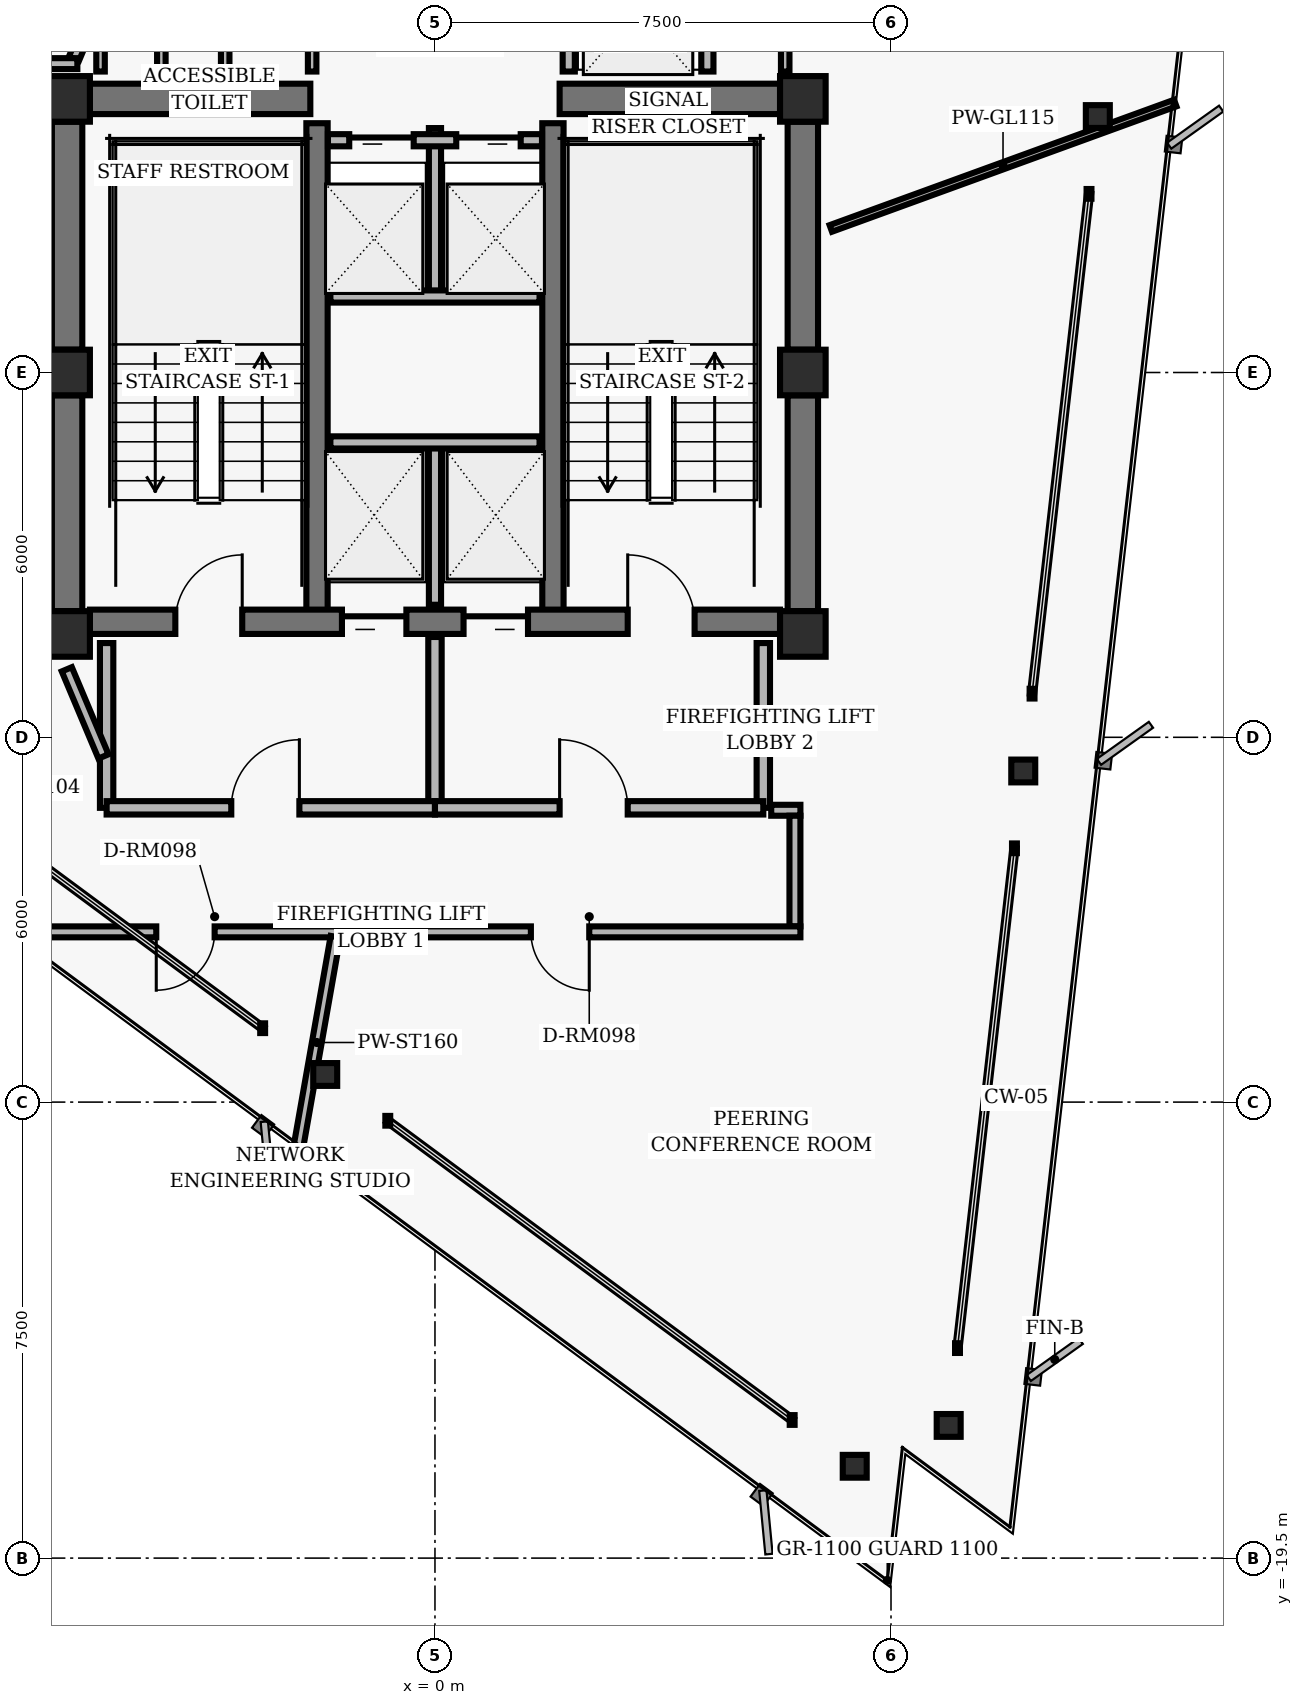
"""IFC4 building model, lengths in metres.
Left out: names, types, materials, properties, quantities, classifications, styles, units other than length and angle.
Written with IfcOpenShell. Run it as: python <this file> out.ifc"""

import sys

from ifc_helpers import new_model, si_unit, direction, frame, frame_2d, origin, origin_2d, place, context, subcontext, project, spatial, rectangle, hollow_rectangle, i_section, extrude, element, fill, save


model = new_model("IFC4")
c1 = context("Model", 3, precision=1e-05, world=origin(), true_north=direction((0.0, 1.0)))
c2 = subcontext(c1, "Body", "Model", "MODEL_VIEW")
j1 = project(units=[si_unit("LENGTHUNIT", "METRE"), si_unit("PLANEANGLEUNIT", "RADIAN")], contexts=[c1])
p1 = place(None, origin())
s1 = spatial("IfcSite", under=j1, at=p1, CompositionType="ELEMENT")
p2 = place(p1, origin())
s2 = spatial("IfcBuilding", under=s1, at=p2, CompositionType="ELEMENT")
p3 = place(p2, frame((0.0, 0.0, 217.92)))
s3 = spatial("IfcBuildingStorey", under=s2, at=p3, CompositionType="ELEMENT", Elevation=217.92)
for number, where, z_axis, x_axis in (
    (1, (-6.05, 4.5, 0.0), (0.0, 0.0, 1.0), (1.0, 0.0, 0.0)),
    (2, (6.05, 4.5, 0.0), (0.0, 0.0, 1.0), (1.0, 0.0, 0.0)),
    (3, (-6.05, 0.0, 0.0), (0.0, 0.0, 1.0), (1.0, 0.0, 0.0)),
    (4, (6.05, 0.0, 0.0), (0.0, 0.0, 1.0), (1.0, 0.0, 0.0)),
    (5, (-6.05, -4.3, 0.0), (0.0, 0.0, 1.0), (1.0, 0.0, 0.0)),
    (6, (6.05, -4.3, 0.0), (0.0, 0.0, 1.0), (1.0, 0.0, 0.0)),
):
    element("IfcColumn", number, at=place(p3, frame(where, z_axis=z_axis, x_axis=x_axis)), inside=s3, PredefinedType="COLUMN", context=c2, shape_type="SweptSolid", body=[
        extrude(hollow_rectangle(XDim=0.75, YDim=0.75, WallThickness=0.05, InnerFilletRadius=0.02, OuterFilletRadius=0.04, at=origin_2d()), origin(), (0.0, 0.0, 1.0), 3.04),
    ])
p4 = place(p3, frame((-6.05, 0.375, 0.0), z_axis=(0.0, 0.0, 1.0), x_axis=(0.0, 1.0, 0.0)))
e7 = element("IfcWall", 7, at=p4, inside=s3, PredefinedType="SHEAR", context=c2, shape_type="SweptSolid", body=[
    extrude(rectangle(XDim=3.75, YDim=0.5, at=frame_2d((1.875, 0.0))), origin(), (0.0, 0.0, 1.0), 2.798),
])
p5 = place(p3, frame((-6.05, -3.925, 0.0), z_axis=(0.0, 0.0, 1.0), x_axis=(0.0, 1.0, 0.0)))
e8 = element("IfcWall", 8, at=p5, inside=s3, PredefinedType="SHEAR", context=c2, shape_type="SweptSolid", body=[
    extrude(rectangle(XDim=3.55, YDim=0.5, at=frame_2d((1.775, 0.0))), origin(), (0.0, 0.0, 1.0), 2.798),
])
p6 = place(p3, frame((6.05, 0.375, 0.0), z_axis=(0.0, 0.0, 1.0), x_axis=(0.0, 1.0, 0.0)))
e9 = element("IfcWall", 9, at=p6, inside=s3, PredefinedType="SHEAR", context=c2, shape_type="SweptSolid", body=[
    extrude(rectangle(XDim=3.75, YDim=0.5, at=frame_2d((1.875, 0.0))), origin(), (0.0, 0.0, 1.0), 2.798),
])
p7 = place(p3, frame((6.05, -3.925, 0.0), z_axis=(0.0, 0.0, 1.0), x_axis=(0.0, 1.0, 0.0)))
e10 = element("IfcWall", 10, at=p7, inside=s3, PredefinedType="SHEAR", context=c2, shape_type="SweptSolid", body=[
    extrude(rectangle(XDim=3.55, YDim=0.5, at=frame_2d((1.775, 0.0))), origin(), (0.0, 0.0, 1.0), 2.798),
])
for number, where, z_axis, x_axis in (
    (11, (-1.94, -4.1, 0.0), (0.0, 0.0, 1.0), (0.0, 1.0, 0.0)),
    (12, (1.94, -4.1, 0.0), (0.0, 0.0, 1.0), (0.0, 1.0, 0.0)),
):
    element("IfcWall", number, at=place(p3, frame(where, z_axis=z_axis, x_axis=x_axis)), inside=s3, PredefinedType="SHEAR", context=c2, shape_type="SweptSolid", body=[
        extrude(rectangle(XDim=8.2, YDim=0.35, at=frame_2d((4.1, 0.0))), origin(), (0.0, 0.0, 1.0), 2.798),
    ])
p8 = place(p3, frame((-5.675, -4.1, 0.0), z_axis=(0.0, 0.0, 1.0), x_axis=(1.0, 0.0, 0.0)))
e13 = element("IfcWall", 13, at=p8, inside=s3, PredefinedType="SHEAR", context=c2, shape_type="SweptSolid", body=[
    extrude(rectangle(XDim=11.35, YDim=0.4, at=frame_2d((5.675, 0.0))), origin(), (0.0, 0.0, 1.0), 2.798),
])
p9 = place(p8, frame((1.405, 0.0, 0.0)))
e14 = element("IfcOpeningElement", 14, at=p9, cuts=e13, PredefinedType="OPENING", context=c2, shape_type="SweptSolid", body=[
    extrude(rectangle(XDim=1.1, YDim=2.04, at=frame_2d((0.55, 1.02))), frame((0.0, 0.21, 0.0), z_axis=(0.0, -1.0, 0.0), x_axis=(1.0, 0.0, 0.0)), (0.0, 0.0, 1.0), 0.42),
])
p10 = place(p8, frame((8.845, 0.0, 0.0)))
e15 = element("IfcOpeningElement", 15, at=p10, cuts=e13, PredefinedType="OPENING", context=c2, shape_type="SweptSolid", body=[
    extrude(rectangle(XDim=1.1, YDim=2.04, at=frame_2d((0.55, 1.02))), frame((0.0, 0.21, 0.0), z_axis=(0.0, -1.0, 0.0), x_axis=(1.0, 0.0, 0.0)), (0.0, 0.0, 1.0), 0.42),
])
p11 = place(p8, frame((4.145, 0.0, 0.0)))
e16 = element("IfcOpeningElement", 16, at=p11, cuts=e13, PredefinedType="OPENING", context=c2, shape_type="SweptSolid", body=[
    extrude(rectangle(XDim=1.06, YDim=2.04, at=frame_2d((0.53, 1.02))), frame((0.0, 0.21, 0.0), z_axis=(0.0, -1.0, 0.0), x_axis=(1.0, 0.0, 0.0)), (0.0, 0.0, 1.0), 0.42),
])
p12 = place(p8, frame((6.145, 0.0, 0.0)))
e17 = element("IfcOpeningElement", 17, at=p12, cuts=e13, PredefinedType="OPENING", context=c2, shape_type="SweptSolid", body=[
    extrude(rectangle(XDim=1.06, YDim=2.04, at=frame_2d((0.53, 1.02))), frame((0.0, 0.21, 0.0), z_axis=(0.0, -1.0, 0.0), x_axis=(1.0, 0.0, 0.0)), (0.0, 0.0, 1.0), 0.42),
])
for number, where, z_axis, x_axis in (
    (18, (-5.675, 4.5, 0.0), (0.0, 0.0, 1.0), (1.0, 0.0, 0.0)),
    (19, (2.05, 4.5, 0.0), (0.0, 0.0, 1.0), (1.0, 0.0, 0.0)),
):
    element("IfcWall", number, at=place(p3, frame(where, z_axis=z_axis, x_axis=x_axis)), inside=s3, PredefinedType="SHEAR", context=c2, shape_type="SweptSolid", body=[
        extrude(rectangle(XDim=3.625, YDim=0.5, at=frame_2d((1.812, 0.0))), origin(), (0.0, 0.0, 1.0), 2.798),
    ])
for number, where, z_axis, x_axis in (
    (20, (8.448, -17.318, 0.0), (0.0, 0.0, 1.0), (1.0, 0.0, 0.0)),
    (21, (9.675, -6.554, 0.0), (0.0, 0.0, 1.0), (1.0, 0.0, 0.0)),
    (22, (10.901, 4.21, 0.0), (0.0, 0.0, 1.0), (1.0, 0.0, 0.0)),
    (23, (-1.805, -11.546, 0.0), (0.0, 0.0, 1.0), (1.0, 0.0, 0.0)),
    (24, (6.903, -17.99, 0.0), (0.0, 0.0, 1.0), (1.0, 0.0, 0.0)),
):
    element("IfcColumn", number, at=place(p3, frame(where, z_axis=z_axis, x_axis=x_axis)), inside=s3, PredefinedType="COLUMN", context=c2, shape_type="SweptSolid", body=[
        extrude(i_section(OverallWidth=0.394, OverallDepth=0.375, WebThickness=0.017, FlangeThickness=0.028, FilletRadius=0.016, at=origin_2d()), origin(), (0.0, 0.0, 1.0), 3.04),
    ])
p13 = place(p3, frame((0.0, -3.82, 0.0), z_axis=(0.0, 0.0, 1.0), x_axis=(0.0, 1.0, 0.0)))
e25 = element("IfcWall", 25, at=p13, inside=s3, PredefinedType="PARTITIONING", context=c2, shape_type="SweptSolid", body=[
    extrude(rectangle(XDim=2.67, YDim=0.2, at=frame_2d((1.335, 0.0))), origin(), (0.0, 0.0, 1.0), 2.773),
])
p14 = place(p3, frame((-1.72, -1.15, 0.0), z_axis=(0.0, 0.0, 1.0), x_axis=(1.0, 0.0, 0.0)))
e26 = element("IfcWall", 26, at=p14, inside=s3, PredefinedType="PARTITIONING", context=c2, shape_type="SweptSolid", body=[
    extrude(rectangle(XDim=3.44, YDim=0.2, at=frame_2d((1.72, 0.0))), origin(), (0.0, 0.0, 1.0), 2.773),
])
for number, where, z_axis, x_axis in (
    (27, (-5.4, -7.16, 0.0), (0.0, 0.0, 1.0), (0.0, 1.0, 0.0)),
    (28, (5.4, -7.16, 0.0), (0.0, 0.0, 1.0), (0.0, 1.0, 0.0)),
):
    element("IfcWall", number, at=place(p3, frame(where, z_axis=z_axis, x_axis=x_axis)), inside=s3, PredefinedType="PARTITIONING", context=c2, shape_type="SweptSolid", body=[
        extrude(rectangle(XDim=2.71, YDim=0.22, at=frame_2d((1.355, 0.0))), origin(), (0.0, 0.0, 1.0), 2.773),
    ])
p15 = place(p3, frame((0.0, -7.16, 0.0), z_axis=(0.0, 0.0, 1.0), x_axis=(0.0, 1.0, 0.0)))
e29 = element("IfcWall", 29, at=p15, inside=s3, PredefinedType="PARTITIONING", context=c2, shape_type="SweptSolid", body=[
    extrude(rectangle(XDim=2.81, YDim=0.22, at=frame_2d((1.405, 0.0))), origin(), (0.0, 0.0, 1.0), 2.773),
])
p16 = place(p3, frame((-5.4, -7.16, 0.0), z_axis=(0.0, 0.0, 1.0), x_axis=(1.0, 0.0, 0.0)))
e30 = element("IfcWall", 30, at=p16, inside=s3, PredefinedType="PARTITIONING", context=c2, shape_type="SweptSolid", body=[
    extrude(rectangle(XDim=5.4, YDim=0.22, at=frame_2d((2.7, 0.0))), origin(), (0.0, 0.0, 1.0), 2.395),
])
p17 = place(p16, frame((2.05, 0.0, 0.0)))
e31 = element("IfcOpeningElement", 31, at=p17, cuts=e30, PredefinedType="OPENING", context=c2, shape_type="SweptSolid", body=[
    extrude(rectangle(XDim=1.12, YDim=2.02, at=frame_2d((0.56, 1.01))), frame((0.0, 0.12, 0.0), z_axis=(0.0, -1.0, 0.0), x_axis=(1.0, 0.0, 0.0)), (0.0, 0.0, 1.0), 0.24),
])
p18 = place(p3, frame((0.0, -7.16, 0.0), z_axis=(0.0, 0.0, 1.0), x_axis=(1.0, 0.0, 0.0)))
e32 = element("IfcWall", 32, at=p18, inside=s3, PredefinedType="PARTITIONING", context=c2, shape_type="SweptSolid", body=[
    extrude(rectangle(XDim=5.4, YDim=0.22, at=frame_2d((2.7, 0.0))), origin(), (0.0, 0.0, 1.0), 2.773),
])
p19 = place(p18, frame((2.05, 0.0, 0.0)))
e33 = element("IfcOpeningElement", 33, at=p19, cuts=e32, PredefinedType="OPENING", context=c2, shape_type="SweptSolid", body=[
    extrude(rectangle(XDim=1.12, YDim=2.02, at=frame_2d((0.56, 1.01))), frame((0.0, 0.12, 0.0), z_axis=(0.0, -1.0, 0.0), x_axis=(1.0, 0.0, 0.0)), (0.0, 0.0, 1.0), 0.24),
])
p20 = place(p3, frame((0.0, 1.25, 0.0), z_axis=(0.0, 0.0, 1.0), x_axis=(0.0, 1.0, 0.0)))
e34 = element("IfcWall", 34, at=p20, inside=s3, PredefinedType="PARTITIONING", context=c2, shape_type="SweptSolid", body=[
    extrude(rectangle(XDim=2.77, YDim=0.2, at=frame_2d((1.385, 0.0))), origin(), (0.0, 0.0, 1.0), 2.773),
])
p21 = place(p3, frame((-1.72, 1.25, 0.0), z_axis=(0.0, 0.0, 1.0), x_axis=(1.0, 0.0, 0.0)))
e35 = element("IfcWall", 35, at=p21, inside=s3, PredefinedType="PARTITIONING", context=c2, shape_type="SweptSolid", body=[
    extrude(rectangle(XDim=3.44, YDim=0.2, at=frame_2d((1.72, 0.0))), origin(), (0.0, 0.0, 1.0), 2.773),
])
p22 = place(p3, frame((-1.76, 3.82, 0.0), z_axis=(0.0, 0.0, 1.0), x_axis=(1.0, 0.0, 0.0)))
e36 = element("IfcWall", 36, at=p22, inside=s3, PredefinedType="PARTITIONING", context=c2, shape_type="SweptSolid", body=[
    extrude(rectangle(XDim=3.52, YDim=0.2, at=frame_2d((1.76, 0.0))), origin(), (0.0, 0.0, 1.0), 2.773),
])
p23 = place(p22, frame((0.35, 0.0, 0.0)))
e37 = element("IfcOpeningElement", 37, at=p23, cuts=e36, PredefinedType="OPENING", context=c2, shape_type="SweptSolid", body=[
    extrude(rectangle(XDim=1.06, YDim=2.04, at=frame_2d((0.53, 1.02))), frame((0.0, 0.11, 0.0), z_axis=(0.0, -1.0, 0.0), x_axis=(1.0, 0.0, 0.0)), (0.0, 0.0, 1.0), 0.22),
])
p24 = place(p22, frame((2.11, 0.0, 0.0)))
e38 = element("IfcOpeningElement", 38, at=p24, cuts=e36, PredefinedType="OPENING", context=c2, shape_type="SweptSolid", body=[
    extrude(rectangle(XDim=1.06, YDim=2.04, at=frame_2d((0.53, 1.02))), frame((0.0, 0.11, 0.0), z_axis=(0.0, -1.0, 0.0), x_axis=(1.0, 0.0, 0.0)), (0.0, 0.0, 1.0), 0.22),
])
for number, where, z_axis, x_axis in (
    (39, (2.2, 4.95, 0.0), (0.0, 0.0, 1.0), (0.0, 1.0, 0.0)),
    (40, (4.48, 4.95, 0.0), (0.0, 0.0, 1.0), (0.0, 1.0, 0.0)),
):
    element("IfcWall", number, at=place(p3, frame(where, z_axis=z_axis, x_axis=x_axis)), inside=s3, PredefinedType="PARTITIONING", context=c2, shape_type="SweptSolid", body=[
        extrude(rectangle(XDim=2.1, YDim=0.2, at=frame_2d((1.05, 0.0))), origin(), (0.0, 0.0, 1.0), 2.773),
    ])
for number, where, z_axis, x_axis in (
    (41, (-5.5, 4.95, 0.0), (0.0, 0.0, 1.0), (0.0, 1.0, 0.0)),
    (42, (-4.5, 4.95, 0.0), (0.0, 0.0, 1.0), (0.0, 1.0, 0.0)),
    (43, (-3.45, 4.95, 0.0), (0.0, 0.0, 1.0), (0.0, 1.0, 0.0)),
    (44, (-2.02, 4.95, 0.0), (0.0, 0.0, 1.0), (0.0, 1.0, 0.0)),
    (45, (5.76, 4.95, 0.0), (0.0, 0.0, 1.0), (0.0, 1.0, 0.0)),
):
    element("IfcWall", number, at=place(p3, frame(where, z_axis=z_axis, x_axis=x_axis)), inside=s3, PredefinedType="PARTITIONING", context=c2, shape_type="SweptSolid", body=[
        extrude(rectangle(XDim=2.1, YDim=0.14, at=frame_2d((1.05, 0.0))), origin(), (0.0, 0.0, 1.0), 2.773),
    ])
p25 = place(p3, frame((-5.632, 5.887, 0.0), z_axis=(0.0, 0.0, 1.0), x_axis=(-0.387792833522, -0.921746558588, 0.0)))
e46 = element("IfcWall", 46, at=p25, inside=s3, PredefinedType="PARTITIONING", context=c2, shape_type="SweptSolid", body=[
    extrude(rectangle(XDim=0.785, YDim=0.18, at=frame_2d((0.393, 0.0))), origin(), (0.0, 0.0, 1.0), 2.773),
])
p26 = place(p3, frame((-5.881, 5.08, 0.0), z_axis=(0.0, 0.0, 1.0), x_axis=(-1.0, 0.0, 0.0)))
e47 = element("IfcWall", 47, at=p26, inside=s3, PredefinedType="PARTITIONING", context=c2, shape_type="SweptSolid", body=[
    extrude(rectangle(XDim=0.589, YDim=0.18, at=frame_2d((0.294, 0.0))), origin(), (0.0, 0.0, 1.0), 2.773),
])
p27 = place(p3, frame((-6.055, -4.882, 0.0), z_axis=(0.0, 0.0, 1.0), x_axis=(0.387579540458, -0.921836265189, 0.0)))
e48 = element("IfcWall", 48, at=p27, inside=s3, PredefinedType="PARTITIONING", context=c2, shape_type="SweptSolid", body=[
    extrude(rectangle(XDim=1.555, YDim=0.18, at=frame_2d((0.777, 0.0))), origin(), (0.0, 0.0, 1.0), 2.253),
])
p28 = place(p3, frame((5.53, -7.2, 0.0), z_axis=(0.0, 0.0, 1.0), x_axis=(1.0, 0.0, 0.0)))
e49 = element("IfcWall", 49, at=p28, inside=s3, PredefinedType="PARTITIONING", context=c2, shape_type="SweptSolid", body=[
    extrude(rectangle(XDim=0.48, YDim=0.18, at=frame_2d((0.24, 0.0))), origin(), (0.0, 0.0, 1.0), 2.773),
])
p29 = place(p3, frame((5.92, -7.29, 0.0), z_axis=(0.0, 0.0, 1.0), x_axis=(0.0, -1.0, 0.0)))
e50 = element("IfcWall", 50, at=p29, inside=s3, PredefinedType="PARTITIONING", context=c2, shape_type="SweptSolid", body=[
    extrude(rectangle(XDim=1.82, YDim=0.18, at=frame_2d((0.91, 0.0))), origin(), (0.0, 0.0, 1.0), 2.253),
])
p30 = place(p3, frame((6.01, -9.2, 0.0), z_axis=(0.0, 0.0, 1.0), x_axis=(-1.0, 0.0, 0.0)))
e51 = element("IfcWall", 51, at=p30, inside=s3, PredefinedType="PARTITIONING", context=c2, shape_type="SweptSolid", body=[
    extrude(rectangle(XDim=12.84, YDim=0.18, at=frame_2d((6.42, 0.0))), origin(), (0.0, 0.0, 1.0), 2.773),
])
p31 = place(p30, frame((9.634, 0.0, 0.0)))
e52 = element("IfcOpeningElement", 52, at=p31, cuts=e51, PredefinedType="OPENING", context=c2, shape_type="SweptSolid", body=[
    extrude(rectangle(XDim=0.96, YDim=2.02, at=frame_2d((0.48, 1.01))), frame((0.0, 0.1, 0.0), z_axis=(0.0, -1.0, 0.0), x_axis=(1.0, 0.0, 0.0)), (0.0, 0.0, 1.0), 0.2),
])
p32 = place(p30, frame((3.473, 0.0, 0.0)))
e53 = element("IfcOpeningElement", 53, at=p32, cuts=e51, PredefinedType="OPENING", context=c2, shape_type="SweptSolid", body=[
    extrude(rectangle(XDim=0.96, YDim=2.02, at=frame_2d((0.48, 1.01))), frame((0.0, 0.1, 0.0), z_axis=(0.0, -1.0, 0.0), x_axis=(1.0, 0.0, 0.0)), (0.0, 0.0, 1.0), 0.2),
])
p33 = place(p3, frame((-1.636, -9.28, 0.0), z_axis=(0.0, 0.0, 1.0), x_axis=(-0.17367100135, -0.984803728308, 0.0)))
e54 = element("IfcWall", 54, at=p33, inside=s3, PredefinedType="PARTITIONING", context=c2, shape_type="SweptSolid", body=[
    extrude(rectangle(XDim=3.533, YDim=0.16, at=frame_2d((1.766, 0.0))), origin(), (0.0, 0.0, 1.0), 2.773),
])
p34 = place(p3, frame((6.51, 2.369, 0.0), z_axis=(0.0, 0.0, 1.0), x_axis=(0.939690503952, 0.342025959222, 0.0)))
e55 = element("IfcWall", 55, at=p34, inside=s3, PredefinedType="MOVABLE", context=c2, shape_type="SweptSolid", body=[
    extrude(rectangle(XDim=6.028, YDim=0.115, at=frame_2d((3.014, 0.0))), origin(), (0.0, 0.0, 1.0), 2.773),
])
p35 = place(p9, origin())
e56 = element("IfcDoor", 56, at=p35, inside=s3, OperationType="SINGLE_SWING_RIGHT", PredefinedType="DOOR", context=c2, shape_type="SweptSolid", body=[
    extrude(rectangle(XDim=1.1, YDim=2.04, at=frame_2d((0.55, 1.02))), frame((0.0, 0.025, 0.0), z_axis=(0.0, -1.0, 0.0), x_axis=(1.0, 0.0, 0.0)), (0.0, 0.0, 1.0), 0.05),
])
fill(e14, e56)
p36 = place(p10, origin())
e57 = element("IfcDoor", 57, at=p36, inside=s3, OperationType="SINGLE_SWING_LEFT", PredefinedType="DOOR", context=c2, shape_type="SweptSolid", body=[
    extrude(rectangle(XDim=1.1, YDim=2.04, at=frame_2d((0.55, 1.02))), frame((0.0, 0.025, 0.0), z_axis=(0.0, -1.0, 0.0), x_axis=(1.0, 0.0, 0.0)), (0.0, 0.0, 1.0), 0.05),
])
fill(e15, e57)
p37 = place(p11, origin())
e58 = element("IfcDoor", 58, at=p37, inside=s3, OperationType="SLIDING_TO_LEFT", PredefinedType="DOOR", context=c2, shape_type="SweptSolid", body=[
    extrude(rectangle(XDim=1.06, YDim=2.04, at=frame_2d((0.53, 1.02))), frame((0.0, 0.025, 0.0), z_axis=(0.0, -1.0, 0.0), x_axis=(1.0, 0.0, 0.0)), (0.0, 0.0, 1.0), 0.05),
])
fill(e16, e58)
p38 = place(p12, origin())
e59 = element("IfcDoor", 59, at=p38, inside=s3, OperationType="SLIDING_TO_RIGHT", PredefinedType="DOOR", context=c2, shape_type="SweptSolid", body=[
    extrude(rectangle(XDim=1.06, YDim=2.04, at=frame_2d((0.53, 1.02))), frame((0.0, 0.025, 0.0), z_axis=(0.0, -1.0, 0.0), x_axis=(1.0, 0.0, 0.0)), (0.0, 0.0, 1.0), 0.05),
])
fill(e17, e59)
p39 = place(p17, origin())
e60 = element("IfcDoor", 60, at=p39, inside=s3, OperationType="SINGLE_SWING_RIGHT", PredefinedType="DOOR", context=c2, shape_type="SweptSolid", body=[
    extrude(rectangle(XDim=1.12, YDim=2.02, at=frame_2d((0.56, 1.01))), frame((0.0, 0.025, 0.0), z_axis=(0.0, -1.0, 0.0), x_axis=(1.0, 0.0, 0.0)), (0.0, 0.0, 1.0), 0.05),
])
fill(e31, e60)
p40 = place(p19, origin())
e61 = element("IfcDoor", 61, at=p40, inside=s3, OperationType="SINGLE_SWING_LEFT", PredefinedType="DOOR", context=c2, shape_type="SweptSolid", body=[
    extrude(rectangle(XDim=1.12, YDim=2.02, at=frame_2d((0.56, 1.01))), frame((0.0, 0.025, 0.0), z_axis=(0.0, -1.0, 0.0), x_axis=(1.0, 0.0, 0.0)), (0.0, 0.0, 1.0), 0.05),
])
fill(e33, e61)
p41 = place(p23, origin())
e62 = element("IfcDoor", 62, at=p41, inside=s3, OperationType="SLIDING_TO_LEFT", PredefinedType="DOOR", context=c2, shape_type="SweptSolid", body=[
    extrude(rectangle(XDim=1.06, YDim=2.04, at=frame_2d((0.53, 1.02))), frame((0.0, 0.025, 0.0), z_axis=(0.0, -1.0, 0.0), x_axis=(1.0, 0.0, 0.0)), (0.0, 0.0, 1.0), 0.05),
])
fill(e37, e62)
p42 = place(p24, origin())
e63 = element("IfcDoor", 63, at=p42, inside=s3, OperationType="SLIDING_TO_RIGHT", PredefinedType="DOOR", context=c2, shape_type="SweptSolid", body=[
    extrude(rectangle(XDim=1.06, YDim=2.04, at=frame_2d((0.53, 1.02))), frame((0.0, 0.025, 0.0), z_axis=(0.0, -1.0, 0.0), x_axis=(1.0, 0.0, 0.0)), (0.0, 0.0, 1.0), 0.05),
])
fill(e38, e63)
p43 = place(p31, origin())
e64 = element("IfcDoor", 64, at=p43, inside=s3, OperationType="SINGLE_SWING_RIGHT", PredefinedType="DOOR", context=c2, shape_type="SweptSolid", body=[
    extrude(rectangle(XDim=0.96, YDim=2.02, at=frame_2d((0.48, 1.01))), frame((0.0, 0.025, 0.0), z_axis=(0.0, -1.0, 0.0), x_axis=(1.0, 0.0, 0.0)), (0.0, 0.0, 1.0), 0.05),
])
fill(e52, e64)
p44 = place(p32, origin())
e65 = element("IfcDoor", 65, at=p44, inside=s3, OperationType="SINGLE_SWING_LEFT", PredefinedType="DOOR", context=c2, shape_type="SweptSolid", body=[
    extrude(rectangle(XDim=0.96, YDim=2.02, at=frame_2d((0.48, 1.01))), frame((0.0, 0.025, 0.0), z_axis=(0.0, -1.0, 0.0), x_axis=(1.0, 0.0, 0.0)), (0.0, 0.0, 1.0), 0.05),
])
fill(e53, e65)
save(model, sys.argv[1])
